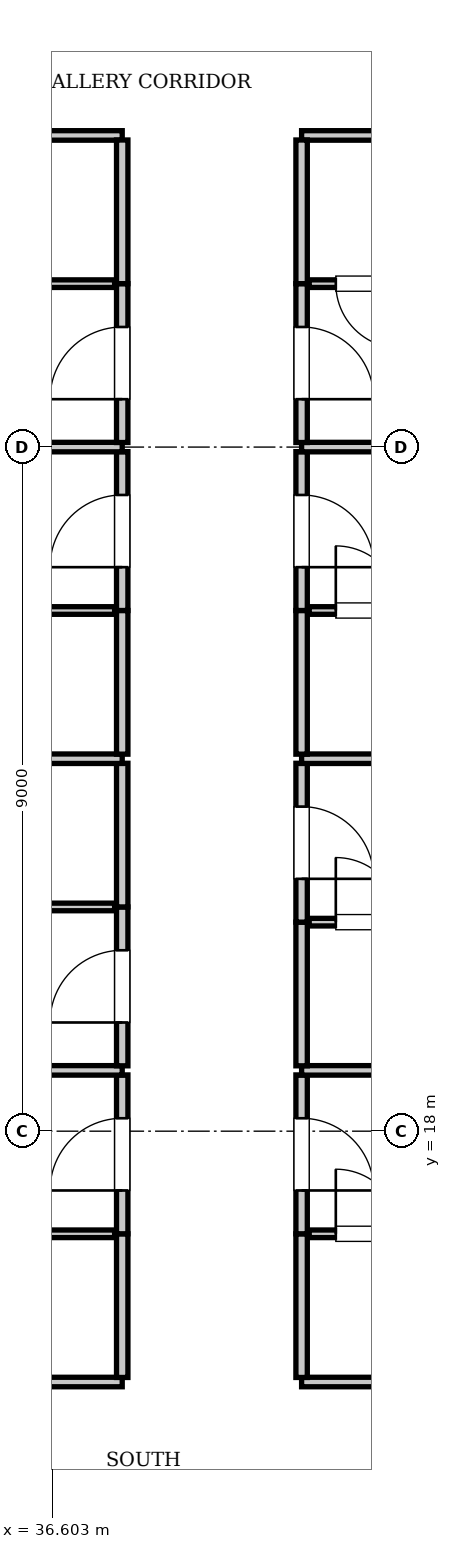
"""IFC4 building model, lengths in metres.
Left out: names, types, materials, properties, quantities, classifications, styles, units other than length and angle.
Written with IfcOpenShell. Run it as: python <this file> out.ifc"""

import sys

from ifc_helpers import new_model, si_unit, direction, frame, frame_2d, origin, place, context, subcontext, project, spatial, rectangle, extrude, element, fill, save


model = new_model("IFC4")
c1 = context("Model", 3, precision=1e-05, world=origin(), true_north=direction((0.0, 1.0)))
c2 = subcontext(c1, "Body", "Model", "MODEL_VIEW")
j1 = project(units=[si_unit("LENGTHUNIT", "METRE"), si_unit("PLANEANGLEUNIT", "RADIAN")], contexts=[c1])
p1 = place(None, origin())
s1 = spatial("IfcSite", under=j1, at=p1, CompositionType="ELEMENT")
p2 = place(p1, origin())
s2 = spatial("IfcBuilding", under=s1, at=p2, CompositionType="ELEMENT")
p3 = place(p2, frame((0.0, 0.0, 181.3)))
s3 = spatial("IfcBuildingStorey", under=s2, at=p3, CompositionType="ELEMENT", Elevation=181.3)
p4 = place(p3, frame((13.2, 14.7, 0.0), z_axis=(0.0, 0.0, 1.0), x_axis=(1.0, 0.0, 0.0)))
e1 = element("IfcWall", 1, at=p4, inside=s3, PredefinedType="PARTITIONING", context=c2, shape_type="SweptSolid", body=[
    extrude(rectangle(XDim=24.32, YDim=0.125, at=frame_2d((12.16, 0.0))), origin(), (0.0, 0.0, 1.0), 3.61),
])
p5 = place(p3, frame((39.88, 14.7, 0.0), z_axis=(0.0, 0.0, 1.0), x_axis=(1.0, 0.0, 0.0)))
e2 = element("IfcWall", 2, at=p5, inside=s3, PredefinedType="PARTITIONING", context=c2, shape_type="SweptSolid", body=[
    extrude(rectangle(XDim=22.52, YDim=0.125, at=frame_2d((11.26, 0.0))), origin(), (0.0, 0.0, 1.0), 3.61),
])
p6 = place(p3, frame((13.2, 31.1, 0.0), z_axis=(0.0, 0.0, 1.0), x_axis=(1.0, 0.0, 0.0)))
e3 = element("IfcWall", 3, at=p6, inside=s3, PredefinedType="PARTITIONING", context=c2, shape_type="SweptSolid", body=[
    extrude(rectangle(XDim=24.32, YDim=0.125, at=frame_2d((12.16, 0.0))), origin(), (0.0, 0.0, 1.0), 3.61),
])
p7 = place(p3, frame((39.88, 31.1, 0.0), z_axis=(0.0, 0.0, 1.0), x_axis=(1.0, 0.0, 0.0)))
e4 = element("IfcWall", 4, at=p7, inside=s3, PredefinedType="PARTITIONING", context=c2, shape_type="SweptSolid", body=[
    extrude(rectangle(XDim=22.52, YDim=0.125, at=frame_2d((11.26, 0.0))), origin(), (0.0, 0.0, 1.0), 3.61),
])
p8 = place(p3, frame((37.52, 14.76, 0.0), z_axis=(0.0, 0.0, 1.0), x_axis=(0.0, 1.0, 0.0)))
e5 = element("IfcWall", 5, at=p8, inside=s3, PredefinedType="PARTITIONING", context=c2, shape_type="SweptSolid", body=[
    extrude(rectangle(XDim=1.89, YDim=0.15, at=frame_2d((0.945, 0.0))), origin(), (0.0, 0.0, 1.0), 3.61),
])
p9 = place(p3, frame((37.52, 16.65, 0.0), z_axis=(0.0, 0.0, 1.0), x_axis=(0.0, 1.0, 0.0)))
e6 = element("IfcWall", 6, at=p9, inside=s3, PredefinedType="PARTITIONING", context=c2, shape_type="SweptSolid", body=[
    extrude(rectangle(XDim=2.09, YDim=0.15, at=frame_2d((1.045, 0.0))), origin(), (0.0, 0.0, 1.0), 3.61),
])
p10 = place(p9, frame((0.57, 0.0, 0.0)))
e7 = element("IfcOpeningElement", 7, at=p10, cuts=e6, PredefinedType="OPENING", context=c2, shape_type="SweptSolid", body=[
    extrude(rectangle(XDim=0.95, YDim=2.15, at=frame_2d((0.475, 1.075))), frame((0.0, 0.085, 0.0), z_axis=(0.0, -1.0, 0.0), x_axis=(1.0, 0.0, 0.0)), (0.0, 0.0, 1.0), 0.17),
])
p11 = place(p3, frame((35.12, 16.65, 0.0), z_axis=(0.0, 0.0, 1.0), x_axis=(1.0, 0.0, 0.0)))
e8 = element("IfcWall", 8, at=p11, inside=s3, PredefinedType="PARTITIONING", context=c2, shape_type="SweptSolid", body=[
    extrude(rectangle(XDim=2.3, YDim=0.1, at=frame_2d((1.15, 0.0))), origin(), (0.0, 0.0, 1.0), 3.61),
])
p12 = place(p11, frame((0.35, 0.0, 0.0)))
e9 = element("IfcOpeningElement", 9, at=p12, cuts=e8, PredefinedType="OPENING", context=c2, shape_type="SweptSolid", body=[
    extrude(rectangle(XDim=0.85, YDim=2.1, at=frame_2d((0.425, 1.05))), frame((0.0, 0.06, 0.0), z_axis=(0.0, -1.0, 0.0), x_axis=(1.0, 0.0, 0.0)), (0.0, 0.0, 1.0), 0.12),
])
p13 = place(p3, frame((39.88, 14.76, 0.0), z_axis=(0.0, 0.0, 1.0), x_axis=(0.0, 1.0, 0.0)))
e10 = element("IfcWall", 10, at=p13, inside=s3, PredefinedType="PARTITIONING", context=c2, shape_type="SweptSolid", body=[
    extrude(rectangle(XDim=1.89, YDim=0.15, at=frame_2d((0.945, 0.0))), origin(), (0.0, 0.0, 1.0), 3.61),
])
p14 = place(p3, frame((39.88, 16.65, 0.0), z_axis=(0.0, 0.0, 1.0), x_axis=(0.0, 1.0, 0.0)))
e11 = element("IfcWall", 11, at=p14, inside=s3, PredefinedType="PARTITIONING", context=c2, shape_type="SweptSolid", body=[
    extrude(rectangle(XDim=2.09, YDim=0.15, at=frame_2d((1.045, 0.0))), origin(), (0.0, 0.0, 1.0), 3.61),
])
p15 = place(p14, frame((0.57, 0.0, 0.0)))
e12 = element("IfcOpeningElement", 12, at=p15, cuts=e11, PredefinedType="OPENING", context=c2, shape_type="SweptSolid", body=[
    extrude(rectangle(XDim=0.95, YDim=2.15, at=frame_2d((0.475, 1.075))), frame((0.0, 0.085, 0.0), z_axis=(0.0, -1.0, 0.0), x_axis=(1.0, 0.0, 0.0)), (0.0, 0.0, 1.0), 0.17),
])
p16 = place(p3, frame((39.98, 16.65, 0.0), z_axis=(0.0, 0.0, 1.0), x_axis=(1.0, 0.0, 0.0)))
e13 = element("IfcWall", 13, at=p16, inside=s3, PredefinedType="PARTITIONING", context=c2, shape_type="SweptSolid", body=[
    extrude(rectangle(XDim=2.3, YDim=0.1, at=frame_2d((1.15, 0.0))), origin(), (0.0, 0.0, 1.0), 3.61),
])
p17 = place(p16, frame((0.35, 0.0, 0.0)))
e14 = element("IfcOpeningElement", 14, at=p17, cuts=e13, PredefinedType="OPENING", context=c2, shape_type="SweptSolid", body=[
    extrude(rectangle(XDim=0.85, YDim=2.1, at=frame_2d((0.425, 1.05))), frame((0.0, 0.06, 0.0), z_axis=(0.0, -1.0, 0.0), x_axis=(1.0, 0.0, 0.0)), (0.0, 0.0, 1.0), 0.12),
])
p18 = place(p3, frame((13.2, 18.8, 0.0), z_axis=(0.0, 0.0, 1.0), x_axis=(1.0, 0.0, 0.0)))
e15 = element("IfcWall", 15, at=p18, inside=s3, PredefinedType="PARTITIONING", context=c2, shape_type="SweptSolid", body=[
    extrude(rectangle(XDim=24.32, YDim=0.125, at=frame_2d((12.16, 0.0))), origin(), (0.0, 0.0, 1.0), 3.61),
])
p19 = place(p3, frame((39.88, 18.8, 0.0), z_axis=(0.0, 0.0, 1.0), x_axis=(1.0, 0.0, 0.0)))
e16 = element("IfcWall", 16, at=p19, inside=s3, PredefinedType="PARTITIONING", context=c2, shape_type="SweptSolid", body=[
    extrude(rectangle(XDim=22.52, YDim=0.125, at=frame_2d((11.26, 0.0))), origin(), (0.0, 0.0, 1.0), 3.61),
])
p20 = place(p3, frame((37.52, 18.86, 0.0), z_axis=(0.0, 0.0, 1.0), x_axis=(0.0, 1.0, 0.0)))
e17 = element("IfcWall", 17, at=p20, inside=s3, PredefinedType="PARTITIONING", context=c2, shape_type="SweptSolid", body=[
    extrude(rectangle(XDim=2.09, YDim=0.15, at=frame_2d((1.045, 0.0))), origin(), (0.0, 0.0, 1.0), 3.61),
])
p21 = place(p20, frame((0.57, 0.0, 0.0)))
e18 = element("IfcOpeningElement", 18, at=p21, cuts=e17, PredefinedType="OPENING", context=c2, shape_type="SweptSolid", body=[
    extrude(rectangle(XDim=0.95, YDim=2.15, at=frame_2d((0.475, 1.075))), frame((0.0, 0.085, 0.0), z_axis=(0.0, -1.0, 0.0), x_axis=(1.0, 0.0, 0.0)), (0.0, 0.0, 1.0), 0.17),
])
p22 = place(p3, frame((37.52, 20.95, 0.0), z_axis=(0.0, 0.0, 1.0), x_axis=(0.0, 1.0, 0.0)))
e19 = element("IfcWall", 19, at=p22, inside=s3, PredefinedType="PARTITIONING", context=c2, shape_type="SweptSolid", body=[
    extrude(rectangle(XDim=1.89, YDim=0.15, at=frame_2d((0.945, 0.0))), origin(), (0.0, 0.0, 1.0), 3.61),
])
p23 = place(p3, frame((35.12, 20.95, 0.0), z_axis=(0.0, 0.0, 1.0), x_axis=(1.0, 0.0, 0.0)))
e20 = element("IfcWall", 20, at=p23, inside=s3, PredefinedType="PARTITIONING", context=c2, shape_type="SweptSolid", body=[
    extrude(rectangle(XDim=2.3, YDim=0.1, at=frame_2d((1.15, 0.0))), origin(), (0.0, 0.0, 1.0), 3.61),
])
p24 = place(p23, frame((0.35, 0.0, 0.0)))
e21 = element("IfcOpeningElement", 21, at=p24, cuts=e20, PredefinedType="OPENING", context=c2, shape_type="SweptSolid", body=[
    extrude(rectangle(XDim=0.85, YDim=2.1, at=frame_2d((0.425, 1.05))), frame((0.0, 0.06, 0.0), z_axis=(0.0, -1.0, 0.0), x_axis=(1.0, 0.0, 0.0)), (0.0, 0.0, 1.0), 0.12),
])
p25 = place(p3, frame((39.88, 18.86, 0.0), z_axis=(0.0, 0.0, 1.0), x_axis=(0.0, 1.0, 0.0)))
e22 = element("IfcWall", 22, at=p25, inside=s3, PredefinedType="PARTITIONING", context=c2, shape_type="SweptSolid", body=[
    extrude(rectangle(XDim=1.89, YDim=0.15, at=frame_2d((0.945, 0.0))), origin(), (0.0, 0.0, 1.0), 3.61),
])
p26 = place(p3, frame((39.88, 20.75, 0.0), z_axis=(0.0, 0.0, 1.0), x_axis=(0.0, 1.0, 0.0)))
e23 = element("IfcWall", 23, at=p26, inside=s3, PredefinedType="PARTITIONING", context=c2, shape_type="SweptSolid", body=[
    extrude(rectangle(XDim=2.09, YDim=0.15, at=frame_2d((1.045, 0.0))), origin(), (0.0, 0.0, 1.0), 3.61),
])
p27 = place(p26, frame((0.57, 0.0, 0.0)))
e24 = element("IfcOpeningElement", 24, at=p27, cuts=e23, PredefinedType="OPENING", context=c2, shape_type="SweptSolid", body=[
    extrude(rectangle(XDim=0.95, YDim=2.15, at=frame_2d((0.475, 1.075))), frame((0.0, 0.085, 0.0), z_axis=(0.0, -1.0, 0.0), x_axis=(1.0, 0.0, 0.0)), (0.0, 0.0, 1.0), 0.17),
])
p28 = place(p3, frame((39.98, 20.75, 0.0), z_axis=(0.0, 0.0, 1.0), x_axis=(1.0, 0.0, 0.0)))
e25 = element("IfcWall", 25, at=p28, inside=s3, PredefinedType="PARTITIONING", context=c2, shape_type="SweptSolid", body=[
    extrude(rectangle(XDim=2.3, YDim=0.1, at=frame_2d((1.15, 0.0))), origin(), (0.0, 0.0, 1.0), 3.61),
])
p29 = place(p28, frame((0.35, 0.0, 0.0)))
e26 = element("IfcOpeningElement", 26, at=p29, cuts=e25, PredefinedType="OPENING", context=c2, shape_type="SweptSolid", body=[
    extrude(rectangle(XDim=0.85, YDim=2.1, at=frame_2d((0.425, 1.05))), frame((0.0, 0.06, 0.0), z_axis=(0.0, -1.0, 0.0), x_axis=(1.0, 0.0, 0.0)), (0.0, 0.0, 1.0), 0.12),
])
p30 = place(p3, frame((13.2, 22.9, 0.0), z_axis=(0.0, 0.0, 1.0), x_axis=(1.0, 0.0, 0.0)))
e27 = element("IfcWall", 27, at=p30, inside=s3, PredefinedType="PARTITIONING", context=c2, shape_type="SweptSolid", body=[
    extrude(rectangle(XDim=24.32, YDim=0.125, at=frame_2d((12.16, 0.0))), origin(), (0.0, 0.0, 1.0), 3.61),
])
p31 = place(p3, frame((39.88, 22.9, 0.0), z_axis=(0.0, 0.0, 1.0), x_axis=(1.0, 0.0, 0.0)))
e28 = element("IfcWall", 28, at=p31, inside=s3, PredefinedType="PARTITIONING", context=c2, shape_type="SweptSolid", body=[
    extrude(rectangle(XDim=22.52, YDim=0.125, at=frame_2d((11.26, 0.0))), origin(), (0.0, 0.0, 1.0), 3.61),
])
p32 = place(p3, frame((37.52, 22.96, 0.0), z_axis=(0.0, 0.0, 1.0), x_axis=(0.0, 1.0, 0.0)))
e29 = element("IfcWall", 29, at=p32, inside=s3, PredefinedType="PARTITIONING", context=c2, shape_type="SweptSolid", body=[
    extrude(rectangle(XDim=1.89, YDim=0.15, at=frame_2d((0.945, 0.0))), origin(), (0.0, 0.0, 1.0), 3.61),
])
p33 = place(p3, frame((37.52, 24.85, 0.0), z_axis=(0.0, 0.0, 1.0), x_axis=(0.0, 1.0, 0.0)))
e30 = element("IfcWall", 30, at=p33, inside=s3, PredefinedType="PARTITIONING", context=c2, shape_type="SweptSolid", body=[
    extrude(rectangle(XDim=2.09, YDim=0.15, at=frame_2d((1.045, 0.0))), origin(), (0.0, 0.0, 1.0), 3.61),
])
p34 = place(p33, frame((0.57, 0.0, 0.0)))
e31 = element("IfcOpeningElement", 31, at=p34, cuts=e30, PredefinedType="OPENING", context=c2, shape_type="SweptSolid", body=[
    extrude(rectangle(XDim=0.95, YDim=2.15, at=frame_2d((0.475, 1.075))), frame((0.0, 0.085, 0.0), z_axis=(0.0, -1.0, 0.0), x_axis=(1.0, 0.0, 0.0)), (0.0, 0.0, 1.0), 0.17),
])
p35 = place(p3, frame((35.12, 24.85, 0.0), z_axis=(0.0, 0.0, 1.0), x_axis=(1.0, 0.0, 0.0)))
e32 = element("IfcWall", 32, at=p35, inside=s3, PredefinedType="PARTITIONING", context=c2, shape_type="SweptSolid", body=[
    extrude(rectangle(XDim=2.3, YDim=0.1, at=frame_2d((1.15, 0.0))), origin(), (0.0, 0.0, 1.0), 3.61),
])
p36 = place(p35, frame((0.35, 0.0, 0.0)))
e33 = element("IfcOpeningElement", 33, at=p36, cuts=e32, PredefinedType="OPENING", context=c2, shape_type="SweptSolid", body=[
    extrude(rectangle(XDim=0.85, YDim=2.1, at=frame_2d((0.425, 1.05))), frame((0.0, 0.06, 0.0), z_axis=(0.0, -1.0, 0.0), x_axis=(1.0, 0.0, 0.0)), (0.0, 0.0, 1.0), 0.12),
])
p37 = place(p3, frame((39.88, 22.96, 0.0), z_axis=(0.0, 0.0, 1.0), x_axis=(0.0, 1.0, 0.0)))
e34 = element("IfcWall", 34, at=p37, inside=s3, PredefinedType="PARTITIONING", context=c2, shape_type="SweptSolid", body=[
    extrude(rectangle(XDim=1.89, YDim=0.15, at=frame_2d((0.945, 0.0))), origin(), (0.0, 0.0, 1.0), 3.61),
])
p38 = place(p3, frame((39.88, 24.85, 0.0), z_axis=(0.0, 0.0, 1.0), x_axis=(0.0, 1.0, 0.0)))
e35 = element("IfcWall", 35, at=p38, inside=s3, PredefinedType="PARTITIONING", context=c2, shape_type="SweptSolid", body=[
    extrude(rectangle(XDim=2.09, YDim=0.15, at=frame_2d((1.045, 0.0))), origin(), (0.0, 0.0, 1.0), 3.61),
])
p39 = place(p38, frame((0.57, 0.0, 0.0)))
e36 = element("IfcOpeningElement", 36, at=p39, cuts=e35, PredefinedType="OPENING", context=c2, shape_type="SweptSolid", body=[
    extrude(rectangle(XDim=0.95, YDim=2.15, at=frame_2d((0.475, 1.075))), frame((0.0, 0.085, 0.0), z_axis=(0.0, -1.0, 0.0), x_axis=(1.0, 0.0, 0.0)), (0.0, 0.0, 1.0), 0.17),
])
p40 = place(p3, frame((39.98, 24.85, 0.0), z_axis=(0.0, 0.0, 1.0), x_axis=(1.0, 0.0, 0.0)))
e37 = element("IfcWall", 37, at=p40, inside=s3, PredefinedType="PARTITIONING", context=c2, shape_type="SweptSolid", body=[
    extrude(rectangle(XDim=2.3, YDim=0.1, at=frame_2d((1.15, 0.0))), origin(), (0.0, 0.0, 1.0), 3.61),
])
p41 = place(p40, frame((0.35, 0.0, 0.0)))
e38 = element("IfcOpeningElement", 38, at=p41, cuts=e37, PredefinedType="OPENING", context=c2, shape_type="SweptSolid", body=[
    extrude(rectangle(XDim=0.85, YDim=2.1, at=frame_2d((0.425, 1.05))), frame((0.0, 0.06, 0.0), z_axis=(0.0, -1.0, 0.0), x_axis=(1.0, 0.0, 0.0)), (0.0, 0.0, 1.0), 0.12),
])
p42 = place(p3, frame((13.2, 27.0, 0.0), z_axis=(0.0, 0.0, 1.0), x_axis=(1.0, 0.0, 0.0)))
e39 = element("IfcWall", 39, at=p42, inside=s3, PredefinedType="PARTITIONING", context=c2, shape_type="SweptSolid", body=[
    extrude(rectangle(XDim=24.32, YDim=0.125, at=frame_2d((12.16, 0.0))), origin(), (0.0, 0.0, 1.0), 2.41),
])
p43 = place(p3, frame((39.88, 27.0, 0.0), z_axis=(0.0, 0.0, 1.0), x_axis=(1.0, 0.0, 0.0)))
e40 = element("IfcWall", 40, at=p43, inside=s3, PredefinedType="PARTITIONING", context=c2, shape_type="SweptSolid", body=[
    extrude(rectangle(XDim=22.52, YDim=0.125, at=frame_2d((11.26, 0.0))), origin(), (0.0, 0.0, 1.0), 2.41),
])
p44 = place(p3, frame((37.52, 27.06, 0.0), z_axis=(0.0, 0.0, 1.0), x_axis=(0.0, 1.0, 0.0)))
e41 = element("IfcWall", 41, at=p44, inside=s3, PredefinedType="PARTITIONING", context=c2, shape_type="SweptSolid", body=[
    extrude(rectangle(XDim=2.09, YDim=0.15, at=frame_2d((1.045, 0.0))), origin(), (0.0, 0.0, 1.0), 3.61),
])
p45 = place(p44, frame((0.57, 0.0, 0.0)))
e42 = element("IfcOpeningElement", 42, at=p45, cuts=e41, PredefinedType="OPENING", context=c2, shape_type="SweptSolid", body=[
    extrude(rectangle(XDim=0.95, YDim=2.15, at=frame_2d((0.475, 1.075))), frame((0.0, 0.085, 0.0), z_axis=(0.0, -1.0, 0.0), x_axis=(1.0, 0.0, 0.0)), (0.0, 0.0, 1.0), 0.17),
])
p46 = place(p3, frame((37.52, 29.15, 0.0), z_axis=(0.0, 0.0, 1.0), x_axis=(0.0, 1.0, 0.0)))
e43 = element("IfcWall", 43, at=p46, inside=s3, PredefinedType="PARTITIONING", context=c2, shape_type="SweptSolid", body=[
    extrude(rectangle(XDim=1.89, YDim=0.15, at=frame_2d((0.945, 0.0))), origin(), (0.0, 0.0, 1.0), 3.61),
])
p47 = place(p3, frame((35.12, 29.15, 0.0), z_axis=(0.0, 0.0, 1.0), x_axis=(1.0, 0.0, 0.0)))
e44 = element("IfcWall", 44, at=p47, inside=s3, PredefinedType="PARTITIONING", context=c2, shape_type="SweptSolid", body=[
    extrude(rectangle(XDim=2.3, YDim=0.1, at=frame_2d((1.15, 0.0))), origin(), (0.0, 0.0, 1.0), 3.61),
])
p48 = place(p47, frame((0.35, 0.0, 0.0)))
e45 = element("IfcOpeningElement", 45, at=p48, cuts=e44, PredefinedType="OPENING", context=c2, shape_type="SweptSolid", body=[
    extrude(rectangle(XDim=0.85, YDim=2.1, at=frame_2d((0.425, 1.05))), frame((0.0, 0.06, 0.0), z_axis=(0.0, -1.0, 0.0), x_axis=(1.0, 0.0, 0.0)), (0.0, 0.0, 1.0), 0.12),
])
p49 = place(p3, frame((39.88, 27.06, 0.0), z_axis=(0.0, 0.0, 1.0), x_axis=(0.0, 1.0, 0.0)))
e46 = element("IfcWall", 46, at=p49, inside=s3, PredefinedType="PARTITIONING", context=c2, shape_type="SweptSolid", body=[
    extrude(rectangle(XDim=2.09, YDim=0.15, at=frame_2d((1.045, 0.0))), origin(), (0.0, 0.0, 1.0), 3.61),
])
p50 = place(p49, frame((0.57, 0.0, 0.0)))
e47 = element("IfcOpeningElement", 47, at=p50, cuts=e46, PredefinedType="OPENING", context=c2, shape_type="SweptSolid", body=[
    extrude(rectangle(XDim=0.95, YDim=2.15, at=frame_2d((0.475, 1.075))), frame((0.0, 0.085, 0.0), z_axis=(0.0, -1.0, 0.0), x_axis=(1.0, 0.0, 0.0)), (0.0, 0.0, 1.0), 0.17),
])
p51 = place(p3, frame((39.88, 29.15, 0.0), z_axis=(0.0, 0.0, 1.0), x_axis=(0.0, 1.0, 0.0)))
e48 = element("IfcWall", 48, at=p51, inside=s3, PredefinedType="PARTITIONING", context=c2, shape_type="SweptSolid", body=[
    extrude(rectangle(XDim=1.89, YDim=0.15, at=frame_2d((0.945, 0.0))), origin(), (0.0, 0.0, 1.0), 3.61),
])
p52 = place(p3, frame((39.98, 29.15, 0.0), z_axis=(0.0, 0.0, 1.0), x_axis=(1.0, 0.0, 0.0)))
e49 = element("IfcWall", 49, at=p52, inside=s3, PredefinedType="PARTITIONING", context=c2, shape_type="SweptSolid", body=[
    extrude(rectangle(XDim=2.3, YDim=0.1, at=frame_2d((1.15, 0.0))), origin(), (0.0, 0.0, 1.0), 3.61),
])
p53 = place(p52, frame((0.35, 0.0, 0.0)))
e50 = element("IfcOpeningElement", 50, at=p53, cuts=e49, PredefinedType="OPENING", context=c2, shape_type="SweptSolid", body=[
    extrude(rectangle(XDim=0.85, YDim=2.1, at=frame_2d((0.425, 1.05))), frame((0.0, 0.06, 0.0), z_axis=(0.0, -1.0, 0.0), x_axis=(1.0, 0.0, 0.0)), (0.0, 0.0, 1.0), 0.12),
])
p54 = place(p10, origin())
e51 = element("IfcDoor", 51, at=p54, inside=s3, OperationType="SINGLE_SWING_LEFT", PredefinedType="DOOR", context=c2, shape_type="SweptSolid", body=[
    extrude(rectangle(XDim=0.95, YDim=2.15, at=frame_2d((0.475, 1.075))), frame((0.0, 0.025, 0.0), z_axis=(0.0, -1.0, 0.0), x_axis=(1.0, 0.0, 0.0)), (0.0, 0.0, 1.0), 0.05),
])
fill(e7, e51)
p55 = place(p17, origin())
e52 = element("IfcDoor", 52, at=p55, inside=s3, OperationType="SINGLE_SWING_LEFT", PredefinedType="DOOR", context=c2, shape_type="SweptSolid", body=[
    extrude(rectangle(XDim=0.85, YDim=2.1, at=frame_2d((0.425, 1.05))), frame((0.0, 0.025, 0.0), z_axis=(0.0, -1.0, 0.0), x_axis=(1.0, 0.0, 0.0)), (0.0, 0.0, 1.0), 0.05),
])
fill(e14, e52)
p56 = place(p15, frame((0.95, 0.0, 0.0), z_axis=(0.0, 0.0, 1.0), x_axis=(-1.0, 0.0, 0.0)))
e53 = element("IfcDoor", 53, at=p56, inside=s3, OperationType="SINGLE_SWING_RIGHT", PredefinedType="DOOR", context=c2, shape_type="SweptSolid", body=[
    extrude(rectangle(XDim=0.95, YDim=2.15, at=frame_2d((0.475, 1.075))), frame((0.0, 0.025, 0.0), z_axis=(0.0, -1.0, 0.0), x_axis=(1.0, 0.0, 0.0)), (0.0, 0.0, 1.0), 0.05),
])
fill(e12, e53)
p57 = place(p21, origin())
e54 = element("IfcDoor", 54, at=p57, inside=s3, OperationType="SINGLE_SWING_LEFT", PredefinedType="DOOR", context=c2, shape_type="SweptSolid", body=[
    extrude(rectangle(XDim=0.95, YDim=2.15, at=frame_2d((0.475, 1.075))), frame((0.0, 0.025, 0.0), z_axis=(0.0, -1.0, 0.0), x_axis=(1.0, 0.0, 0.0)), (0.0, 0.0, 1.0), 0.05),
])
fill(e18, e54)
p58 = place(p29, origin())
e55 = element("IfcDoor", 55, at=p58, inside=s3, OperationType="SINGLE_SWING_LEFT", PredefinedType="DOOR", context=c2, shape_type="SweptSolid", body=[
    extrude(rectangle(XDim=0.85, YDim=2.1, at=frame_2d((0.425, 1.05))), frame((0.0, 0.025, 0.0), z_axis=(0.0, -1.0, 0.0), x_axis=(1.0, 0.0, 0.0)), (0.0, 0.0, 1.0), 0.05),
])
fill(e26, e55)
p59 = place(p27, frame((0.95, 0.0, 0.0), z_axis=(0.0, 0.0, 1.0), x_axis=(-1.0, 0.0, 0.0)))
e56 = element("IfcDoor", 56, at=p59, inside=s3, OperationType="SINGLE_SWING_RIGHT", PredefinedType="DOOR", context=c2, shape_type="SweptSolid", body=[
    extrude(rectangle(XDim=0.95, YDim=2.15, at=frame_2d((0.475, 1.075))), frame((0.0, 0.025, 0.0), z_axis=(0.0, -1.0, 0.0), x_axis=(1.0, 0.0, 0.0)), (0.0, 0.0, 1.0), 0.05),
])
fill(e24, e56)
p60 = place(p34, origin())
e57 = element("IfcDoor", 57, at=p60, inside=s3, OperationType="SINGLE_SWING_LEFT", PredefinedType="DOOR", context=c2, shape_type="SweptSolid", body=[
    extrude(rectangle(XDim=0.95, YDim=2.15, at=frame_2d((0.475, 1.075))), frame((0.0, 0.025, 0.0), z_axis=(0.0, -1.0, 0.0), x_axis=(1.0, 0.0, 0.0)), (0.0, 0.0, 1.0), 0.05),
])
fill(e31, e57)
p61 = place(p41, origin())
e58 = element("IfcDoor", 58, at=p61, inside=s3, OperationType="SINGLE_SWING_LEFT", PredefinedType="DOOR", context=c2, shape_type="SweptSolid", body=[
    extrude(rectangle(XDim=0.85, YDim=2.1, at=frame_2d((0.425, 1.05))), frame((0.0, 0.025, 0.0), z_axis=(0.0, -1.0, 0.0), x_axis=(1.0, 0.0, 0.0)), (0.0, 0.0, 1.0), 0.05),
])
fill(e38, e58)
p62 = place(p39, frame((0.95, 0.0, 0.0), z_axis=(0.0, 0.0, 1.0), x_axis=(-1.0, 0.0, 0.0)))
e59 = element("IfcDoor", 59, at=p62, inside=s3, OperationType="SINGLE_SWING_RIGHT", PredefinedType="DOOR", context=c2, shape_type="SweptSolid", body=[
    extrude(rectangle(XDim=0.95, YDim=2.15, at=frame_2d((0.475, 1.075))), frame((0.0, 0.025, 0.0), z_axis=(0.0, -1.0, 0.0), x_axis=(1.0, 0.0, 0.0)), (0.0, 0.0, 1.0), 0.05),
])
fill(e36, e59)
p63 = place(p45, origin())
e60 = element("IfcDoor", 60, at=p63, inside=s3, OperationType="SINGLE_SWING_LEFT", PredefinedType="DOOR", context=c2, shape_type="SweptSolid", body=[
    extrude(rectangle(XDim=0.95, YDim=2.15, at=frame_2d((0.475, 1.075))), frame((0.0, 0.025, 0.0), z_axis=(0.0, -1.0, 0.0), x_axis=(1.0, 0.0, 0.0)), (0.0, 0.0, 1.0), 0.05),
])
fill(e42, e60)
p64 = place(p53, frame((0.85, 0.0, 0.0), z_axis=(0.0, 0.0, 1.0), x_axis=(-1.0, 0.0, 0.0)))
e61 = element("IfcDoor", 61, at=p64, inside=s3, OperationType="SINGLE_SWING_LEFT", PredefinedType="DOOR", context=c2, shape_type="SweptSolid", body=[
    extrude(rectangle(XDim=0.85, YDim=2.1, at=frame_2d((0.425, 1.05))), frame((0.0, 0.025, 0.0), z_axis=(0.0, -1.0, 0.0), x_axis=(1.0, 0.0, 0.0)), (0.0, 0.0, 1.0), 0.05),
])
fill(e50, e61)
p65 = place(p50, frame((0.95, 0.0, 0.0), z_axis=(0.0, 0.0, 1.0), x_axis=(-1.0, 0.0, 0.0)))
e62 = element("IfcDoor", 62, at=p65, inside=s3, OperationType="SINGLE_SWING_RIGHT", PredefinedType="DOOR", context=c2, shape_type="SweptSolid", body=[
    extrude(rectangle(XDim=0.95, YDim=2.15, at=frame_2d((0.475, 1.075))), frame((0.0, 0.025, 0.0), z_axis=(0.0, -1.0, 0.0), x_axis=(1.0, 0.0, 0.0)), (0.0, 0.0, 1.0), 0.05),
])
fill(e47, e62)
save(model, sys.argv[1])
